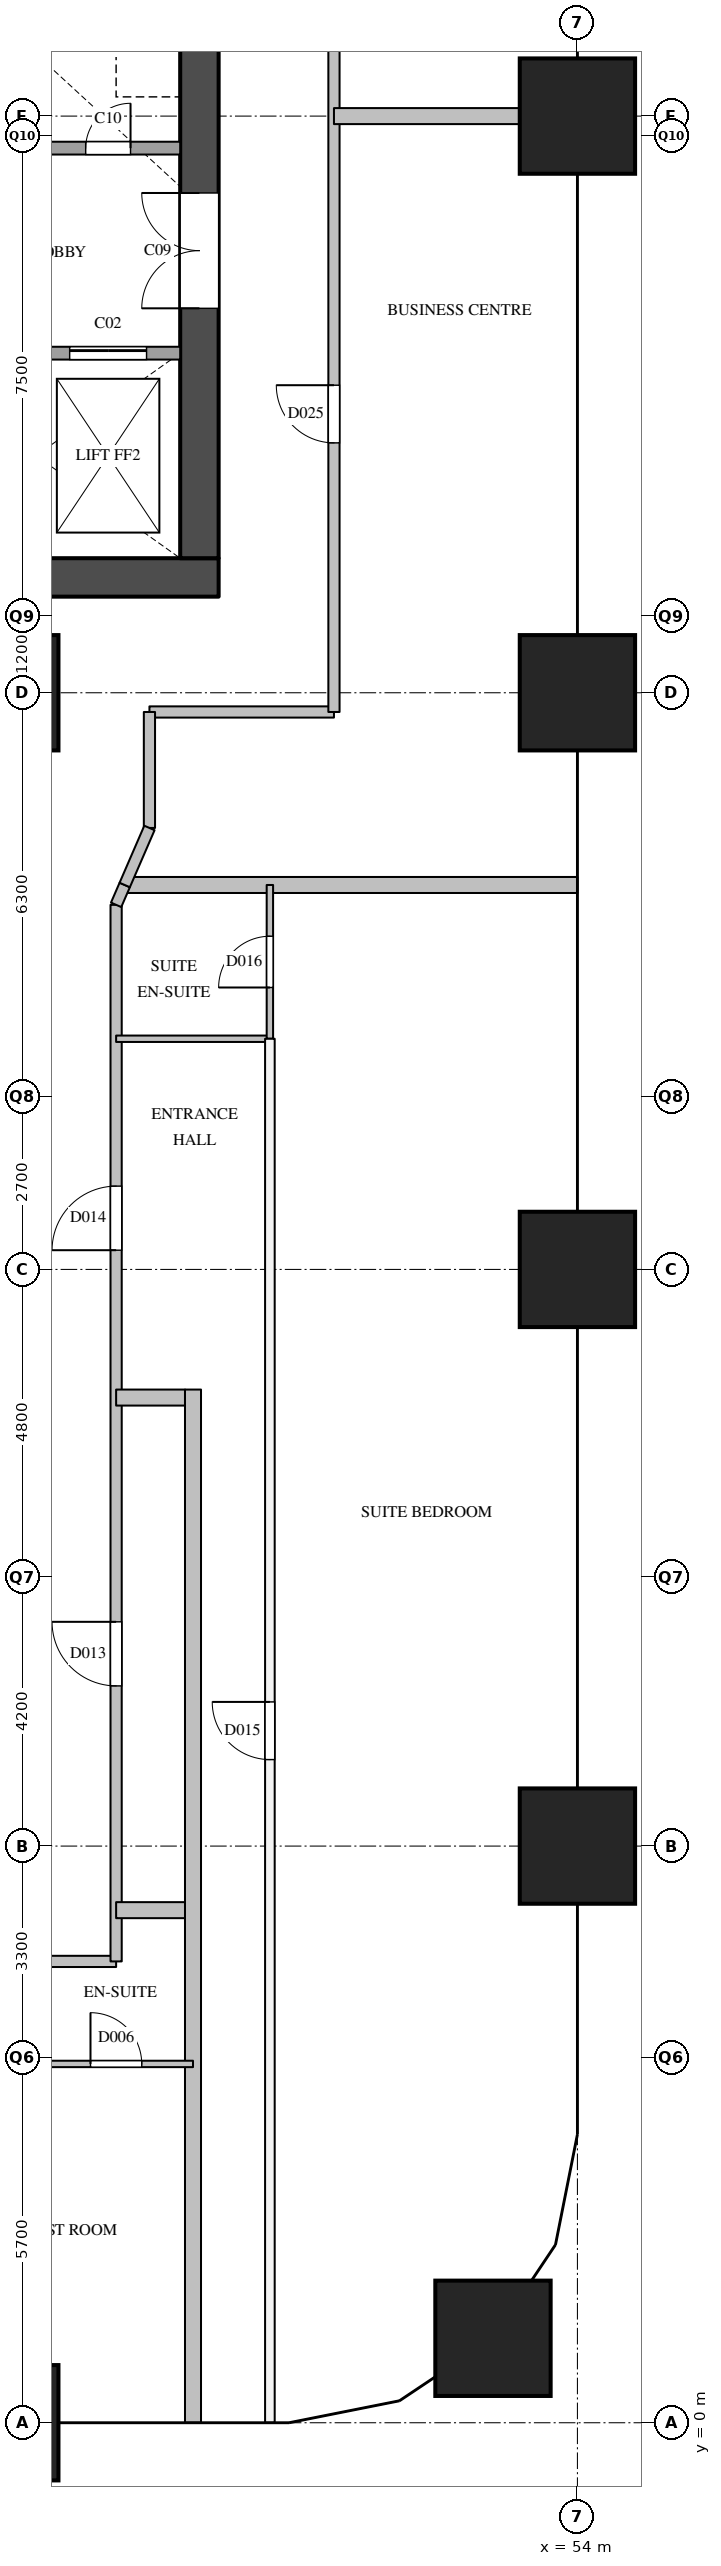
"""IFC4 building model, lengths in metres.
Left out: names, types, materials, properties, quantities, classifications, styles, units other than length and angle.
Written with IfcOpenShell. Run it as: python <this file> out.ifc"""

import sys

from ifc_helpers import new_model, si_unit, direction, frame, frame_2d, origin, origin_2d, place, context, subcontext, project, spatial, rectangle, extrude, element, fill, save


model = new_model("IFC4")
c1 = context("Model", 3, precision=1e-05, world=origin(), true_north=direction((0.0, 1.0)))
c2 = subcontext(c1, "Body", "Model", "MODEL_VIEW")
j1 = project(units=[si_unit("LENGTHUNIT", "METRE"), si_unit("PLANEANGLEUNIT", "RADIAN")], contexts=[c1])
p1 = place(None, origin())
s1 = spatial("IfcSite", under=j1, at=p1, CompositionType="ELEMENT")
p2 = place(p1, origin())
s2 = spatial("IfcBuilding", under=s1, at=p2, CompositionType="ELEMENT")
p3 = place(p2, frame((0.0, 0.0, 81.6)))
s3 = spatial("IfcBuildingStorey", under=s2, at=p3, CompositionType="ELEMENT", Elevation=81.6)
for number, where, z_axis, x_axis in (
    (1, (45.0, 0.0, 0.0), (0.0, 0.0, 1.0), (1.0, 0.0, 0.0)),
    (2, (45.0, 27.0, 0.0), (0.0, 0.0, 1.0), (1.0, 0.0, 0.0)),
    (3, (52.682, 1.318, 0.0), (0.0, 0.0, 1.0), (1.0, 0.0, 0.0)),
    (4, (54.0, 9.0, 0.0), (0.0, 0.0, 1.0), (1.0, 0.0, 0.0)),
    (5, (54.0, 18.0, 0.0), (0.0, 0.0, 1.0), (1.0, 0.0, 0.0)),
    (6, (54.0, 27.0, 0.0), (0.0, 0.0, 1.0), (1.0, 0.0, 0.0)),
    (7, (54.0, 36.0, 0.0), (0.0, 0.0, 1.0), (1.0, 0.0, 0.0)),
):
    element("IfcColumn", number, at=place(p3, frame(where, z_axis=z_axis, x_axis=x_axis)), inside=s3, PredefinedType="COLUMN", context=c2, shape_type="SweptSolid", body=[
        extrude(rectangle(XDim=1.8, YDim=1.8, at=origin_2d()), origin(), (0.0, 0.0, 1.0), 3.8),
    ])
p4 = place(p3, frame((36.0, 28.8, 0.0), z_axis=(0.0, 0.0, 1.0), x_axis=(1.0, 0.0, 0.0)))
e8 = element("IfcWall", 8, at=p4, inside=s3, PredefinedType="SHEAR", context=c2, shape_type="SweptSolid", body=[
    extrude(rectangle(XDim=12.4, YDim=0.6, at=frame_2d((6.2, 0.0))), origin(), (0.0, 0.0, 1.0), 3.5),
])
p5 = place(p3, frame((48.1, 29.1, 0.0), z_axis=(0.0, 0.0, 1.0), x_axis=(0.0, 1.0, 0.0)))
e9 = element("IfcWall", 9, at=p5, inside=s3, PredefinedType="SHEAR", context=c2, shape_type="SweptSolid", body=[
    extrude(rectangle(XDim=20.3, YDim=0.6, at=frame_2d((10.15, 0.0))), origin(), (0.0, 0.0, 1.0), 3.5),
])
p6 = place(p5, frame((12.5, 0.0, 0.0)))
e10 = element("IfcOpeningElement", 10, at=p6, cuts=e9, PredefinedType="OPENING", context=c2, shape_type="SweptSolid", body=[
    extrude(rectangle(XDim=0.7, YDim=2.1, at=frame_2d((0.35, 1.05))), frame((0.0, 0.31, 0.0), z_axis=(0.0, -1.0, 0.0), x_axis=(1.0, 0.0, 0.0)), (0.0, 0.0, 1.0), 0.62),
])
p7 = place(p5, frame((3.9, 0.0, 0.0)))
e11 = element("IfcOpeningElement", 11, at=p7, cuts=e9, PredefinedType="OPENING", context=c2, shape_type="SweptSolid", body=[
    extrude(rectangle(XDim=1.8, YDim=2.1, at=frame_2d((0.9, 1.05))), frame((0.0, 0.31, 0.0), z_axis=(0.0, -1.0, 0.0), x_axis=(1.0, 0.0, 0.0)), (0.0, 0.0, 1.0), 0.62),
])
p8 = place(p3, frame((36.6, 32.3, 0.0), z_axis=(0.0, 0.0, 1.0), x_axis=(1.0, 0.0, 0.0)))
e12 = element("IfcWall", 12, at=p8, inside=s3, PredefinedType="SOLIDWALL", context=c2, shape_type="SweptSolid", body=[
    extrude(rectangle(XDim=11.2, YDim=0.2, at=frame_2d((5.6, 0.0))), origin(), (0.0, 0.0, 1.0), 3.5),
])
p9 = place(p8, frame((7.225, 0.0, 0.0)))
e13 = element("IfcOpeningElement", 13, at=p9, cuts=e12, PredefinedType="OPENING", context=c2, shape_type="SweptSolid", body=[
    extrude(rectangle(XDim=1.2, YDim=2.1, at=frame_2d((0.6, 1.05))), frame((0.0, 0.11, 0.0), z_axis=(0.0, -1.0, 0.0), x_axis=(1.0, 0.0, 0.0)), (0.0, 0.0, 1.0), 0.22),
])
p10 = place(p8, frame((9.475, 0.0, 0.0)))
e14 = element("IfcOpeningElement", 14, at=p10, cuts=e12, PredefinedType="OPENING", context=c2, shape_type="SweptSolid", body=[
    extrude(rectangle(XDim=1.2, YDim=2.1, at=frame_2d((0.6, 1.05))), frame((0.0, 0.11, 0.0), z_axis=(0.0, -1.0, 0.0), x_axis=(1.0, 0.0, 0.0)), (0.0, 0.0, 1.0), 0.22),
])
p11 = place(p3, frame((43.3, 35.5, 0.0), z_axis=(0.0, 0.0, 1.0), x_axis=(1.0, 0.0, 0.0)))
e15 = element("IfcWall", 15, at=p11, inside=s3, PredefinedType="SOLIDWALL", context=c2, shape_type="SweptSolid", body=[
    extrude(rectangle(XDim=4.5, YDim=0.2, at=frame_2d((2.25, 0.0))), origin(), (0.0, 0.0, 1.0), 3.5),
])
p12 = place(p11, frame((0.525, 0.0, 0.0)))
e16 = element("IfcOpeningElement", 16, at=p12, cuts=e15, PredefinedType="OPENING", context=c2, shape_type="SweptSolid", body=[
    extrude(rectangle(XDim=1.2, YDim=2.1, at=frame_2d((0.6, 1.05))), frame((0.0, 0.11, 0.0), z_axis=(0.0, -1.0, 0.0), x_axis=(1.0, 0.0, 0.0)), (0.0, 0.0, 1.0), 0.22),
])
p13 = place(p11, frame((3.025, 0.0, 0.0)))
e17 = element("IfcOpeningElement", 17, at=p13, cuts=e15, PredefinedType="OPENING", context=c2, shape_type="SweptSolid", body=[
    extrude(rectangle(XDim=0.7, YDim=2.1, at=frame_2d((0.35, 1.05))), frame((0.0, 0.11, 0.0), z_axis=(0.0, -1.0, 0.0), x_axis=(1.0, 0.0, 0.0)), (0.0, 0.0, 1.0), 0.22),
])
p14 = place(p3, frame((34.2, 7.2, 0.0), z_axis=(0.0, 0.0, 1.0), x_axis=(1.0, 0.0, 0.0)))
e18 = element("IfcWall", 18, at=p14, inside=s3, PredefinedType="PARTITIONING", context=c2, shape_type="SweptSolid", body=[
    extrude(rectangle(XDim=12.6, YDim=0.175, at=frame_2d((6.3, 0.0))), origin(), (0.0, 0.0, 1.0), 3.5),
])
p15 = place(p14, frame((4.1, 0.0, 0.0)))
e19 = element("IfcOpeningElement", 19, at=p15, cuts=e18, PredefinedType="OPENING", context=c2, shape_type="SweptSolid", body=[
    extrude(rectangle(XDim=1.0, YDim=2.1, at=frame_2d((0.5, 1.05))), frame((0.0, 0.097, 0.0), z_axis=(0.0, -1.0, 0.0), x_axis=(1.0, 0.0, 0.0)), (0.0, 0.0, 1.0), 0.195),
])
p16 = place(p14, frame((10.1, 0.0, 0.0)))
e20 = element("IfcOpeningElement", 20, at=p16, cuts=e18, PredefinedType="OPENING", context=c2, shape_type="SweptSolid", body=[
    extrude(rectangle(XDim=1.0, YDim=2.1, at=frame_2d((0.5, 1.05))), frame((0.0, 0.097, 0.0), z_axis=(0.0, -1.0, 0.0), x_axis=(1.0, 0.0, 0.0)), (0.0, 0.0, 1.0), 0.195),
])
p17 = place(p14, frame((0.4, 0.0, 0.0)))
e21 = element("IfcOpeningElement", 21, at=p17, cuts=e18, PredefinedType="OPENING", context=c2, shape_type="SweptSolid", body=[
    extrude(rectangle(XDim=1.0, YDim=2.1, at=frame_2d((0.5, 1.05))), frame((0.0, 0.097, 0.0), z_axis=(0.0, -1.0, 0.0), x_axis=(1.0, 0.0, 0.0)), (0.0, 0.0, 1.0), 0.195),
])
p18 = place(p3, frame((47.32, 26.7, 0.0), z_axis=(0.0, 0.0, 1.0), x_axis=(1.0, 0.0, 0.0)))
e22 = element("IfcWall", 22, at=p18, inside=s3, PredefinedType="PARTITIONING", context=c2, shape_type="SweptSolid", body=[
    extrude(rectangle(XDim=2.88, YDim=0.175, at=frame_2d((1.44, 0.0))), origin(), (0.0, 0.0, 1.0), 2.5),
])
p19 = place(p3, frame((46.8, 7.2, 0.0), z_axis=(0.0, 0.0, 1.0), x_axis=(0.0, 1.0, 0.0)))
e23 = element("IfcWall", 23, at=p19, inside=s3, PredefinedType="PARTITIONING", context=c2, shape_type="SweptSolid", body=[
    extrude(rectangle(XDim=16.49, YDim=0.175, at=frame_2d((8.245, 0.0))), origin(), (0.0, 0.0, 1.0), 3.5),
])
p20 = place(p19, frame((4.3, 0.0, 0.0)))
e24 = element("IfcOpeningElement", 24, at=p20, cuts=e23, PredefinedType="OPENING", context=c2, shape_type="SweptSolid", body=[
    extrude(rectangle(XDim=1.0, YDim=2.1, at=frame_2d((0.5, 1.05))), frame((0.0, 0.097, 0.0), z_axis=(0.0, -1.0, 0.0), x_axis=(1.0, 0.0, 0.0)), (0.0, 0.0, 1.0), 0.195),
])
p21 = place(p19, frame((11.1, 0.0, 0.0)))
e25 = element("IfcOpeningElement", 25, at=p21, cuts=e23, PredefinedType="OPENING", context=c2, shape_type="SweptSolid", body=[
    extrude(rectangle(XDim=1.0, YDim=2.1, at=frame_2d((0.5, 1.05))), frame((0.0, 0.097, 0.0), z_axis=(0.0, -1.0, 0.0), x_axis=(1.0, 0.0, 0.0)), (0.0, 0.0, 1.0), 0.195),
])
p22 = place(p3, frame((47.32, 24.89, 0.0), z_axis=(0.0, 0.0, 1.0), x_axis=(0.0, 1.0, 0.0)))
e26 = element("IfcWall", 26, at=p22, inside=s3, PredefinedType="PARTITIONING", context=c2, shape_type="SweptSolid", body=[
    extrude(rectangle(XDim=1.81, YDim=0.175, at=frame_2d((0.905, 0.0))), origin(), (0.0, 0.0, 1.0), 2.5),
])
p23 = place(p3, frame((50.2, 26.7, 0.0), z_axis=(0.0, 0.0, 1.0), x_axis=(0.0, 1.0, 0.0)))
e27 = element("IfcWall", 27, at=p23, inside=s3, PredefinedType="PARTITIONING", context=c2, shape_type="SweptSolid", body=[
    extrude(rectangle(XDim=25.1, YDim=0.175, at=frame_2d((12.55, 0.0))), origin(), (0.0, 0.0, 1.0), 2.5),
])
p24 = place(p23, frame((4.2, 0.0, 0.0)))
e28 = element("IfcOpeningElement", 28, at=p24, cuts=e27, PredefinedType="OPENING", context=c2, shape_type="SweptSolid", body=[
    extrude(rectangle(XDim=0.9, YDim=2.1, at=frame_2d((0.45, 1.05))), frame((0.0, 0.097, 0.0), z_axis=(0.0, -1.0, 0.0), x_axis=(1.0, 0.0, 0.0)), (0.0, 0.0, 1.0), 0.195),
])
p25 = place(p23, frame((14.85, 0.0, 0.0)))
e29 = element("IfcOpeningElement", 29, at=p25, cuts=e27, PredefinedType="OPENING", context=c2, shape_type="SweptSolid", body=[
    extrude(rectangle(XDim=0.9, YDim=2.1, at=frame_2d((0.45, 1.05))), frame((0.0, 0.097, 0.0), z_axis=(0.0, -1.0, 0.0), x_axis=(1.0, 0.0, 0.0)), (0.0, 0.0, 1.0), 0.195),
])
p26 = place(p3, frame((49.2, 0.0, 0.0), z_axis=(0.0, 0.0, 1.0), x_axis=(0.0, 1.0, 0.0)))
e30 = element("IfcWall", 30, at=p26, inside=s3, PredefinedType="PARTITIONING", context=c2, shape_type="SweptSolid", body=[
    extrude(rectangle(XDim=21.6, YDim=0.15, at=frame_2d((10.8, 0.0))), origin(), (0.0, 0.0, 1.0), 2.5),
])
p27 = place(p26, frame((10.35, 0.0, 0.0)))
e31 = element("IfcOpeningElement", 31, at=p27, cuts=e30, PredefinedType="OPENING", context=c2, shape_type="SweptSolid", body=[
    extrude(rectangle(XDim=0.9, YDim=2.1, at=frame_2d((0.45, 1.05))), frame((0.0, 0.085, 0.0), z_axis=(0.0, -1.0, 0.0), x_axis=(1.0, 0.0, 0.0)), (0.0, 0.0, 1.0), 0.17),
])
p28 = place(p3, frame((46.8, 8.0, 0.0), z_axis=(0.0, 0.0, 1.0), x_axis=(1.0, 0.0, 0.0)))
e32 = element("IfcWall", 32, at=p28, inside=s3, PredefinedType="PARTITIONING", context=c2, shape_type="SweptSolid", body=[
    extrude(rectangle(XDim=1.2, YDim=0.25, at=frame_2d((0.6, 0.0))), origin(), (0.0, 0.0, 1.0), 3.5),
])
p29 = place(p3, frame((46.8, 16.0, 0.0), z_axis=(0.0, 0.0, 1.0), x_axis=(1.0, 0.0, 0.0)))
e33 = element("IfcWall", 33, at=p29, inside=s3, PredefinedType="PARTITIONING", context=c2, shape_type="SweptSolid", body=[
    extrude(rectangle(XDim=1.075, YDim=0.25, at=frame_2d((0.538, 0.0))), origin(), (0.0, 0.0, 1.0), 3.5),
])
p30 = place(p3, frame((46.934, 24.0, 0.0), z_axis=(0.0, 0.0, 1.0), x_axis=(1.0, 0.0, 0.0)))
e34 = element("IfcWall", 34, at=p30, inside=s3, PredefinedType="PARTITIONING", context=c2, shape_type="SweptSolid", body=[
    extrude(rectangle(XDim=7.066, YDim=0.25, at=frame_2d((3.533, 0.0))), origin(), (0.0, 0.0, 1.0), 2.5),
])
p31 = place(p3, frame((50.2, 36.0, 0.0), z_axis=(0.0, 0.0, 1.0), x_axis=(1.0, 0.0, 0.0)))
e35 = element("IfcWall", 35, at=p31, inside=s3, PredefinedType="PARTITIONING", context=c2, shape_type="SweptSolid", body=[
    extrude(rectangle(XDim=3.8, YDim=0.25, at=frame_2d((1.9, 0.0))), origin(), (0.0, 0.0, 1.0), 3.5),
])
p32 = place(p3, frame((48.0, 0.0, 0.0), z_axis=(0.0, 0.0, 1.0), x_axis=(0.0, 1.0, 0.0)))
e36 = element("IfcWall", 36, at=p32, inside=s3, PredefinedType="PARTITIONING", context=c2, shape_type="SweptSolid", body=[
    extrude(rectangle(XDim=16.125, YDim=0.25, at=frame_2d((8.062, 0.0))), origin(), (0.0, 0.0, 1.0), 2.5),
])
p33 = place(p3, frame((45.6, 5.6, 0.0), z_axis=(0.0, 0.0, 1.0), x_axis=(1.0, 0.0, 0.0)))
e37 = element("IfcWall", 37, at=p33, inside=s3, PredefinedType="PARTITIONING", context=c2, shape_type="SweptSolid", body=[
    extrude(rectangle(XDim=2.4, YDim=0.1, at=frame_2d((1.2, 0.0))), origin(), (0.0, 0.0, 1.0), 3.5),
])
p34 = place(p33, frame((0.8, 0.0, 0.0)))
e38 = element("IfcOpeningElement", 38, at=p34, cuts=e37, PredefinedType="OPENING", context=c2, shape_type="SweptSolid", body=[
    extrude(rectangle(XDim=0.8, YDim=2.1, at=frame_2d((0.4, 1.05))), frame((0.0, 0.06, 0.0), z_axis=(0.0, -1.0, 0.0), x_axis=(1.0, 0.0, 0.0)), (0.0, 0.0, 1.0), 0.12),
])
p35 = place(p3, frame((46.8, 21.6, 0.0), z_axis=(0.0, 0.0, 1.0), x_axis=(1.0, 0.0, 0.0)))
e39 = element("IfcWall", 39, at=p35, inside=s3, PredefinedType="PARTITIONING", context=c2, shape_type="SweptSolid", body=[
    extrude(rectangle(XDim=2.4, YDim=0.1, at=frame_2d((1.2, 0.0))), origin(), (0.0, 0.0, 1.0), 3.5),
])
p36 = place(p3, frame((49.2, 21.6, 0.0), z_axis=(0.0, 0.0, 1.0), x_axis=(0.0, 1.0, 0.0)))
e40 = element("IfcWall", 40, at=p36, inside=s3, PredefinedType="PARTITIONING", context=c2, shape_type="SweptSolid", body=[
    extrude(rectangle(XDim=2.4, YDim=0.1, at=frame_2d((1.2, 0.0))), origin(), (0.0, 0.0, 1.0), 3.5),
])
p37 = place(p36, frame((0.8, 0.0, 0.0)))
e41 = element("IfcOpeningElement", 41, at=p37, cuts=e40, PredefinedType="OPENING", context=c2, shape_type="SweptSolid", body=[
    extrude(rectangle(XDim=0.8, YDim=2.1, at=frame_2d((0.4, 1.05))), frame((0.0, 0.06, 0.0), z_axis=(0.0, -1.0, 0.0), x_axis=(1.0, 0.0, 0.0)), (0.0, 0.0, 1.0), 0.12),
])
p38 = place(p3, frame((46.934, 24.0, 0.0), z_axis=(0.0, 0.0, 1.0), x_axis=(-0.397404653206, -0.917643471949, 0.0)))
e42 = element("IfcWall", 42, at=p38, inside=s3, PredefinedType="PARTITIONING", context=c2, shape_type="SweptSolid", body=[
    extrude(rectangle(XDim=0.338, YDim=0.175, at=frame_2d((0.169, 0.0))), origin(), (0.0, 0.0, 1.0), 3.5),
])
p39 = place(p3, frame((47.32, 24.89, 0.0), z_axis=(0.0, 0.0, 1.0), x_axis=(-0.397713396445, -0.917509702558, 0.0)))
e43 = element("IfcWall", 43, at=p39, inside=s3, PredefinedType="PARTITIONING", context=c2, shape_type="SweptSolid", body=[
    extrude(rectangle(XDim=0.97, YDim=0.175, at=frame_2d((0.485, 0.0))), origin(), (0.0, 0.0, 1.0), 3.5),
])
p40 = place(p10, origin())
e44 = element("IfcDoor", 44, at=p40, inside=s3, OperationType="SLIDING_TO_LEFT", PredefinedType="DOOR", context=c2, shape_type="SweptSolid", body=[
    extrude(rectangle(XDim=1.2, YDim=2.1, at=frame_2d((0.6, 1.05))), frame((0.0, 0.025, 0.0), z_axis=(0.0, -1.0, 0.0), x_axis=(1.0, 0.0, 0.0)), (0.0, 0.0, 1.0), 0.05),
])
fill(e14, e44)
p41 = place(p7, origin())
e45 = element("IfcDoor", 45, at=p41, inside=s3, OperationType="DOUBLE_DOOR_SINGLE_SWING", PredefinedType="DOOR", context=c2, shape_type="SweptSolid", body=[
    extrude(rectangle(XDim=1.8, YDim=2.1, at=frame_2d((0.9, 1.05))), frame((0.0, 0.025, 0.0), z_axis=(0.0, -1.0, 0.0), x_axis=(1.0, 0.0, 0.0)), (0.0, 0.0, 1.0), 0.05),
])
fill(e11, e45)
p42 = place(p13, origin())
e46 = element("IfcDoor", 46, at=p42, inside=s3, OperationType="SINGLE_SWING_RIGHT", PredefinedType="DOOR", context=c2, shape_type="SweptSolid", body=[
    extrude(rectangle(XDim=0.7, YDim=2.1, at=frame_2d((0.35, 1.05))), frame((0.0, 0.025, 0.0), z_axis=(0.0, -1.0, 0.0), x_axis=(1.0, 0.0, 0.0)), (0.0, 0.0, 1.0), 0.05),
])
fill(e17, e46)
p43 = place(p34, origin())
e47 = element("IfcDoor", 47, at=p43, inside=s3, OperationType="SINGLE_SWING_LEFT", PredefinedType="DOOR", context=c2, shape_type="SweptSolid", body=[
    extrude(rectangle(XDim=0.8, YDim=2.1, at=frame_2d((0.4, 1.05))), frame((0.0, 0.025, 0.0), z_axis=(0.0, -1.0, 0.0), x_axis=(1.0, 0.0, 0.0)), (0.0, 0.0, 1.0), 0.05),
])
fill(e38, e47)
p44 = place(p20, origin())
e48 = element("IfcDoor", 48, at=p44, inside=s3, OperationType="SINGLE_SWING_RIGHT", PredefinedType="DOOR", context=c2, shape_type="SweptSolid", body=[
    extrude(rectangle(XDim=1.0, YDim=2.1, at=frame_2d((0.5, 1.05))), frame((0.0, 0.025, 0.0), z_axis=(0.0, -1.0, 0.0), x_axis=(1.0, 0.0, 0.0)), (0.0, 0.0, 1.0), 0.05),
])
fill(e24, e48)
p45 = place(p21, origin())
e49 = element("IfcDoor", 49, at=p45, inside=s3, OperationType="SINGLE_SWING_LEFT", PredefinedType="DOOR", context=c2, shape_type="SweptSolid", body=[
    extrude(rectangle(XDim=1.0, YDim=2.1, at=frame_2d((0.5, 1.05))), frame((0.0, 0.025, 0.0), z_axis=(0.0, -1.0, 0.0), x_axis=(1.0, 0.0, 0.0)), (0.0, 0.0, 1.0), 0.05),
])
fill(e25, e49)
p46 = place(p27, origin())
e50 = element("IfcDoor", 50, at=p46, inside=s3, OperationType="SINGLE_SWING_RIGHT", PredefinedType="DOOR", context=c2, shape_type="SweptSolid", body=[
    extrude(rectangle(XDim=0.9, YDim=2.1, at=frame_2d((0.45, 1.05))), frame((0.0, 0.025, 0.0), z_axis=(0.0, -1.0, 0.0), x_axis=(1.0, 0.0, 0.0)), (0.0, 0.0, 1.0), 0.05),
])
fill(e31, e50)
p47 = place(p37, origin())
e51 = element("IfcDoor", 51, at=p47, inside=s3, OperationType="SINGLE_SWING_LEFT", PredefinedType="DOOR", context=c2, shape_type="SweptSolid", body=[
    extrude(rectangle(XDim=0.8, YDim=2.1, at=frame_2d((0.4, 1.05))), frame((0.0, 0.025, 0.0), z_axis=(0.0, -1.0, 0.0), x_axis=(1.0, 0.0, 0.0)), (0.0, 0.0, 1.0), 0.05),
])
fill(e41, e51)
p48 = place(p24, origin())
e52 = element("IfcDoor", 52, at=p48, inside=s3, OperationType="SINGLE_SWING_RIGHT", PredefinedType="DOOR", context=c2, shape_type="SweptSolid", body=[
    extrude(rectangle(XDim=0.9, YDim=2.1, at=frame_2d((0.45, 1.05))), frame((0.0, 0.025, 0.0), z_axis=(0.0, -1.0, 0.0), x_axis=(1.0, 0.0, 0.0)), (0.0, 0.0, 1.0), 0.05),
])
fill(e28, e52)
save(model, sys.argv[1])
